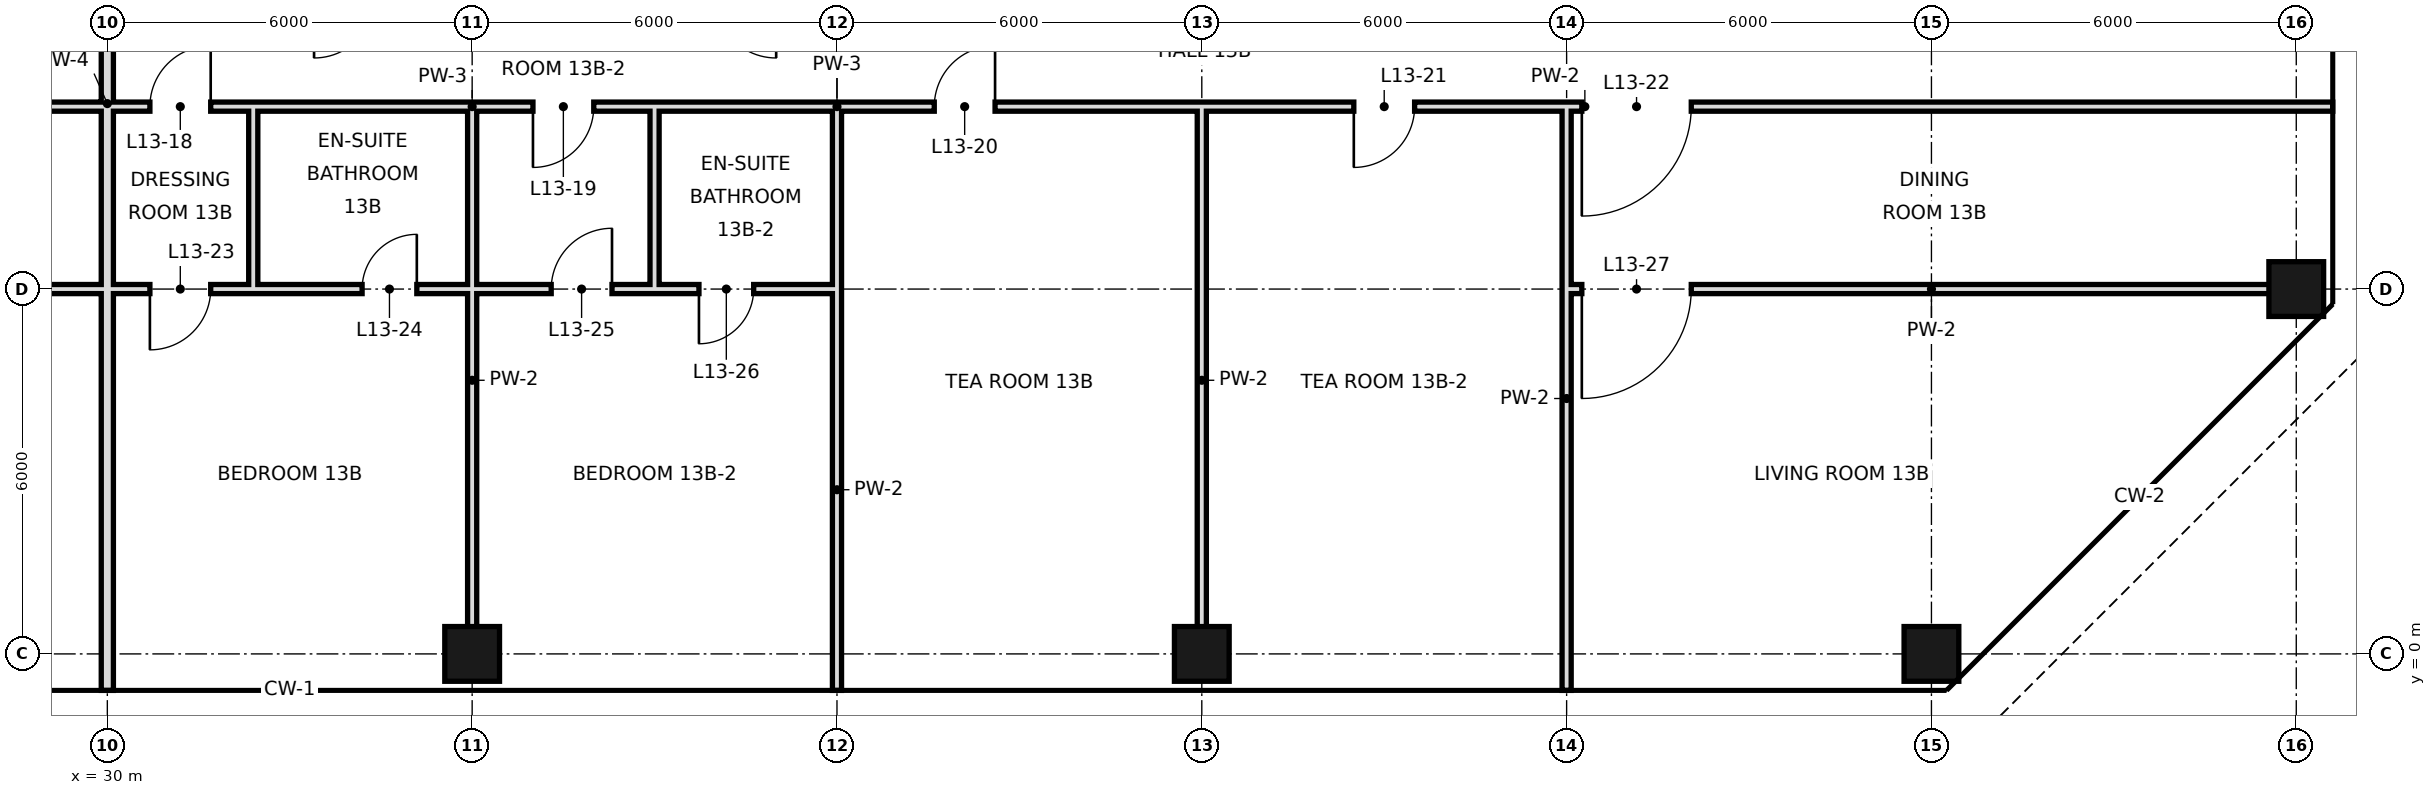
"""IFC4 building model, lengths in metres.
Left out: names, types, materials, properties, quantities, classifications, styles, units other than length and angle.
Written with IfcOpenShell. Run it as: python <this file> out.ifc"""

import sys

from ifc_helpers import new_model, si_unit, direction, frame, frame_2d, origin, origin_2d, place, context, subcontext, project, spatial, rectangle, hollow_rectangle, extrude, element, fill, save


model = new_model("IFC4")
c1 = context("Model", 3, precision=1e-05, world=origin(), true_north=direction((0.0, 1.0)))
c2 = subcontext(c1, "Body", "Model", "MODEL_VIEW")
j1 = project(units=[si_unit("LENGTHUNIT", "METRE"), si_unit("PLANEANGLEUNIT", "RADIAN")], contexts=[c1])
p1 = place(None, origin())
s1 = spatial("IfcSite", under=j1, at=p1, CompositionType="ELEMENT")
p2 = place(p1, origin())
s2 = spatial("IfcBuilding", under=s1, at=p2, CompositionType="ELEMENT")
p3 = place(p2, frame((0.0, 0.0, 67.8)))
s3 = spatial("IfcBuildingStorey", under=s2, at=p3, CompositionType="ELEMENT", Elevation=67.8)
for number, where, z_axis, x_axis in (
    (1, (36.0, 0.0, 0.0), (0.0, 0.0, 1.0), (1.0, 0.0, 0.0)),
    (2, (48.0, 0.0, 0.0), (0.0, 0.0, 1.0), (1.0, 0.0, 0.0)),
    (3, (60.0, 0.0, 0.0), (0.0, 0.0, 1.0), (1.0, 0.0, 0.0)),
    (4, (66.0, 6.0, 0.0), (0.0, 0.0, 1.0), (1.0, 0.0, 0.0)),
):
    element("IfcColumn", number, at=place(p3, frame(where, z_axis=z_axis, x_axis=x_axis)), inside=s3, PredefinedType="COLUMN", context=c2, shape_type="SweptSolid", body=[
        extrude(hollow_rectangle(XDim=0.9, YDim=0.9, WallThickness=0.045, at=origin_2d()), origin(), (0.0, 0.0, 1.0), 3.6),
    ])
p4 = place(p3, frame((30.0, -0.6, 0.0), z_axis=(0.0, 0.0, 1.0), x_axis=(0.0, 1.0, 0.0)))
e5 = element("IfcWall", 5, at=p4, inside=s3, PredefinedType="SOLIDWALL", context=c2, shape_type="SweptSolid", body=[
    extrude(rectangle(XDim=19.3, YDim=0.2, at=frame_2d((9.65, 0.0))), origin(), (0.0, 0.0, 1.0), 2.72),
])
p5 = place(p3, frame((32.4, 6.0, 0.0), z_axis=(0.0, 0.0, 1.0), x_axis=(0.0, 1.0, 0.0)))
e6 = element("IfcWall", 6, at=p5, inside=s3, PredefinedType="PARTITIONING", context=c2, shape_type="SweptSolid", body=[
    extrude(rectangle(XDim=3.0, YDim=0.15, at=frame_2d((1.5, 0.0))), origin(), (0.0, 0.0, 1.0), 3.42),
])
p6 = place(p3, frame((36.0, 0.0, 0.0), z_axis=(0.0, 0.0, 1.0), x_axis=(0.0, 1.0, 0.0)))
e7 = element("IfcWall", 7, at=p6, inside=s3, PredefinedType="PARTITIONING", context=c2, shape_type="SweptSolid", body=[
    extrude(rectangle(XDim=6.0, YDim=0.15, at=frame_2d((3.0, 0.0))), origin(), (0.0, 0.0, 1.0), 2.72),
])
p7 = place(p3, frame((36.0, 6.0, 0.0), z_axis=(0.0, 0.0, 1.0), x_axis=(0.0, 1.0, 0.0)))
e8 = element("IfcWall", 8, at=p7, inside=s3, PredefinedType="PARTITIONING", context=c2, shape_type="SweptSolid", body=[
    extrude(rectangle(XDim=3.0, YDim=0.15, at=frame_2d((1.5, 0.0))), origin(), (0.0, 0.0, 1.0), 2.72),
])
p8 = place(p3, frame((39.0, 6.0, 0.0), z_axis=(0.0, 0.0, 1.0), x_axis=(0.0, 1.0, 0.0)))
e9 = element("IfcWall", 9, at=p8, inside=s3, PredefinedType="PARTITIONING", context=c2, shape_type="SweptSolid", body=[
    extrude(rectangle(XDim=3.0, YDim=0.15, at=frame_2d((1.5, 0.0))), origin(), (0.0, 0.0, 1.0), 3.42),
])
p9 = place(p3, frame((42.0, -0.6, 0.0), z_axis=(0.0, 0.0, 1.0), x_axis=(0.0, 1.0, 0.0)))
e10 = element("IfcWall", 10, at=p9, inside=s3, PredefinedType="PARTITIONING", context=c2, shape_type="SweptSolid", body=[
    extrude(rectangle(XDim=6.6, YDim=0.15, at=frame_2d((3.3, 0.0))), origin(), (0.0, 0.0, 1.0), 2.72),
])
p10 = place(p3, frame((42.0, 6.0, 0.0), z_axis=(0.0, 0.0, 1.0), x_axis=(0.0, 1.0, 0.0)))
e11 = element("IfcWall", 11, at=p10, inside=s3, PredefinedType="PARTITIONING", context=c2, shape_type="SweptSolid", body=[
    extrude(rectangle(XDim=3.0, YDim=0.15, at=frame_2d((1.5, 0.0))), origin(), (0.0, 0.0, 1.0), 2.72),
])
p11 = place(p3, frame((48.0, 0.0, 0.0), z_axis=(0.0, 0.0, 1.0), x_axis=(0.0, 1.0, 0.0)))
e12 = element("IfcWall", 12, at=p11, inside=s3, PredefinedType="PARTITIONING", context=c2, shape_type="SweptSolid", body=[
    extrude(rectangle(XDim=9.0, YDim=0.15, at=frame_2d((4.5, 0.0))), origin(), (0.0, 0.0, 1.0), 2.72),
])
p12 = place(p3, frame((54.0, -0.6, 0.0), z_axis=(0.0, 0.0, 1.0), x_axis=(0.0, 1.0, 0.0)))
e13 = element("IfcWall", 13, at=p12, inside=s3, PredefinedType="PARTITIONING", context=c2, shape_type="SweptSolid", body=[
    extrude(rectangle(XDim=9.6, YDim=0.15, at=frame_2d((4.8, 0.0))), origin(), (0.0, 0.0, 1.0), 3.42),
])
p13 = place(p3, frame((30.0, 6.0, 0.0), z_axis=(0.0, 0.0, 1.0), x_axis=(1.0, 0.0, 0.0)))
e14 = element("IfcWall", 14, at=p13, inside=s3, PredefinedType="PARTITIONING", context=c2, shape_type="SweptSolid", body=[
    extrude(rectangle(XDim=2.4, YDim=0.15, at=frame_2d((1.2, 0.0))), origin(), (0.0, 0.0, 1.0), 2.97),
])
p14 = place(p13, frame((0.7, 0.0, 0.0)))
e15 = element("IfcOpeningElement", 15, at=p14, cuts=e14, PredefinedType="OPENING", context=c2, shape_type="SweptSolid", body=[
    extrude(rectangle(XDim=1.0, YDim=2.4, at=frame_2d((0.5, 1.2))), frame((0.0, 0.085, 0.0), z_axis=(0.0, -1.0, 0.0), x_axis=(1.0, 0.0, 0.0)), (0.0, 0.0, 1.0), 0.17),
])
p15 = place(p3, frame((36.0, 6.0, 0.0), z_axis=(0.0, 0.0, 1.0), x_axis=(1.0, 0.0, 0.0)))
e16 = element("IfcWall", 16, at=p15, inside=s3, PredefinedType="PARTITIONING", context=c2, shape_type="SweptSolid", body=[
    extrude(rectangle(XDim=3.0, YDim=0.15, at=frame_2d((1.5, 0.0))), origin(), (0.0, 0.0, 1.0), 2.97),
])
p16 = place(p15, frame((1.3, 0.0, 0.0)))
e17 = element("IfcOpeningElement", 17, at=p16, cuts=e16, PredefinedType="OPENING", context=c2, shape_type="SweptSolid", body=[
    extrude(rectangle(XDim=1.0, YDim=2.4, at=frame_2d((0.5, 1.2))), frame((0.0, 0.085, 0.0), z_axis=(0.0, -1.0, 0.0), x_axis=(1.0, 0.0, 0.0)), (0.0, 0.0, 1.0), 0.17),
])
p17 = place(p3, frame((54.0, 6.0, 0.0), z_axis=(0.0, 0.0, 1.0), x_axis=(1.0, 0.0, 0.0)))
e18 = element("IfcWall", 18, at=p17, inside=s3, PredefinedType="PARTITIONING", context=c2, shape_type="SweptSolid", body=[
    extrude(rectangle(XDim=12.0, YDim=0.15, at=frame_2d((6.0, 0.0))), origin(), (0.0, 0.0, 1.0), 2.52),
])
p18 = place(p17, frame((0.25, 0.0, 0.0)))
e19 = element("IfcOpeningElement", 19, at=p18, cuts=e18, PredefinedType="OPENING", context=c2, shape_type="SweptSolid", body=[
    extrude(rectangle(XDim=1.8, YDim=2.4, at=frame_2d((0.9, 1.2))), frame((0.0, 0.085, 0.0), z_axis=(0.0, -1.0, 0.0), x_axis=(1.0, 0.0, 0.0)), (0.0, 0.0, 1.0), 0.17),
])
p19 = place(p3, frame((26.4, 6.0, 0.0), z_axis=(0.0, 0.0, 1.0), x_axis=(1.0, 0.0, 0.0)))
e20 = element("IfcWall", 20, at=p19, inside=s3, PredefinedType="PARTITIONING", context=c2, shape_type="SweptSolid", body=[
    extrude(rectangle(XDim=3.6, YDim=0.15, at=frame_2d((1.8, 0.0))), origin(), (0.0, 0.0, 1.0), 2.97),
])
p20 = place(p19, frame((1.35, 0.0, 0.0)))
e21 = element("IfcOpeningElement", 21, at=p20, cuts=e20, PredefinedType="OPENING", context=c2, shape_type="SweptSolid", body=[
    extrude(rectangle(XDim=0.9, YDim=2.4, at=frame_2d((0.45, 1.2))), frame((0.0, 0.085, 0.0), z_axis=(0.0, -1.0, 0.0), x_axis=(1.0, 0.0, 0.0)), (0.0, 0.0, 1.0), 0.17),
])
p21 = place(p3, frame((32.4, 6.0, 0.0), z_axis=(0.0, 0.0, 1.0), x_axis=(1.0, 0.0, 0.0)))
e22 = element("IfcWall", 22, at=p21, inside=s3, PredefinedType="PARTITIONING", context=c2, shape_type="SweptSolid", body=[
    extrude(rectangle(XDim=3.6, YDim=0.15, at=frame_2d((1.8, 0.0))), origin(), (0.0, 0.0, 1.0), 2.97),
])
p22 = place(p21, frame((1.79, 0.0, 0.0)))
e23 = element("IfcOpeningElement", 23, at=p22, cuts=e22, PredefinedType="OPENING", context=c2, shape_type="SweptSolid", body=[
    extrude(rectangle(XDim=0.9, YDim=2.4, at=frame_2d((0.45, 1.2))), frame((0.0, 0.085, 0.0), z_axis=(0.0, -1.0, 0.0), x_axis=(1.0, 0.0, 0.0)), (0.0, 0.0, 1.0), 0.17),
])
p23 = place(p3, frame((39.0, 6.0, 0.0), z_axis=(0.0, 0.0, 1.0), x_axis=(1.0, 0.0, 0.0)))
e24 = element("IfcWall", 24, at=p23, inside=s3, PredefinedType="PARTITIONING", context=c2, shape_type="SweptSolid", body=[
    extrude(rectangle(XDim=3.0, YDim=0.15, at=frame_2d((1.5, 0.0))), origin(), (0.0, 0.0, 1.0), 2.97),
])
p24 = place(p23, frame((0.73, 0.0, 0.0)))
e25 = element("IfcOpeningElement", 25, at=p24, cuts=e24, PredefinedType="OPENING", context=c2, shape_type="SweptSolid", body=[
    extrude(rectangle(XDim=0.9, YDim=2.4, at=frame_2d((0.45, 1.2))), frame((0.0, 0.085, 0.0), z_axis=(0.0, -1.0, 0.0), x_axis=(1.0, 0.0, 0.0)), (0.0, 0.0, 1.0), 0.17),
])
p25 = place(p3, frame((30.0, 9.0, 0.0), z_axis=(0.0, 0.0, 1.0), x_axis=(1.0, 0.0, 0.0)))
e26 = element("IfcWall", 26, at=p25, inside=s3, PredefinedType="PARTITIONING", context=c2, shape_type="SweptSolid", body=[
    extrude(rectangle(XDim=2.4, YDim=0.15, at=frame_2d((1.2, 0.0))), origin(), (0.0, 0.0, 1.0), 3.42),
])
p26 = place(p25, frame((0.7, 0.0, 0.0)))
e27 = element("IfcOpeningElement", 27, at=p26, cuts=e26, PredefinedType="OPENING", context=c2, shape_type="SweptSolid", body=[
    extrude(rectangle(XDim=1.0, YDim=2.4, at=frame_2d((0.5, 1.2))), frame((0.0, 0.085, 0.0), z_axis=(0.0, -1.0, 0.0), x_axis=(1.0, 0.0, 0.0)), (0.0, 0.0, 1.0), 0.17),
])
p27 = place(p3, frame((36.0, 9.0, 0.0), z_axis=(0.0, 0.0, 1.0), x_axis=(1.0, 0.0, 0.0)))
e28 = element("IfcWall", 28, at=p27, inside=s3, PredefinedType="PARTITIONING", context=c2, shape_type="SweptSolid", body=[
    extrude(rectangle(XDim=3.0, YDim=0.15, at=frame_2d((1.5, 0.0))), origin(), (0.0, 0.0, 1.0), 3.42),
])
p28 = place(p27, frame((1.0, 0.0, 0.0)))
e29 = element("IfcOpeningElement", 29, at=p28, cuts=e28, PredefinedType="OPENING", context=c2, shape_type="SweptSolid", body=[
    extrude(rectangle(XDim=1.0, YDim=2.4, at=frame_2d((0.5, 1.2))), frame((0.0, 0.085, 0.0), z_axis=(0.0, -1.0, 0.0), x_axis=(1.0, 0.0, 0.0)), (0.0, 0.0, 1.0), 0.17),
])
p29 = place(p3, frame((42.0, 9.0, 0.0), z_axis=(0.0, 0.0, 1.0), x_axis=(1.0, 0.0, 0.0)))
e30 = element("IfcWall", 30, at=p29, inside=s3, PredefinedType="PARTITIONING", context=c2, shape_type="SweptSolid", body=[
    extrude(rectangle(XDim=24.6, YDim=0.15, at=frame_2d((12.3, 0.0))), origin(), (0.0, 0.0, 1.0), 3.42),
])
p30 = place(p29, frame((1.6, 0.0, 0.0)))
e31 = element("IfcOpeningElement", 31, at=p30, cuts=e30, PredefinedType="OPENING", context=c2, shape_type="SweptSolid", body=[
    extrude(rectangle(XDim=1.0, YDim=2.4, at=frame_2d((0.5, 1.2))), frame((0.0, 0.085, 0.0), z_axis=(0.0, -1.0, 0.0), x_axis=(1.0, 0.0, 0.0)), (0.0, 0.0, 1.0), 0.17),
])
p31 = place(p29, frame((8.5, 0.0, 0.0)))
e32 = element("IfcOpeningElement", 32, at=p31, cuts=e30, PredefinedType="OPENING", context=c2, shape_type="SweptSolid", body=[
    extrude(rectangle(XDim=1.0, YDim=2.4, at=frame_2d((0.5, 1.2))), frame((0.0, 0.085, 0.0), z_axis=(0.0, -1.0, 0.0), x_axis=(1.0, 0.0, 0.0)), (0.0, 0.0, 1.0), 0.17),
])
p32 = place(p29, frame((12.25, 0.0, 0.0)))
e33 = element("IfcOpeningElement", 33, at=p32, cuts=e30, PredefinedType="OPENING", context=c2, shape_type="SweptSolid", body=[
    extrude(rectangle(XDim=1.8, YDim=2.4, at=frame_2d((0.9, 1.2))), frame((0.0, 0.085, 0.0), z_axis=(0.0, -1.0, 0.0), x_axis=(1.0, 0.0, 0.0)), (0.0, 0.0, 1.0), 0.17),
])
for number, where, z_axis, x_axis in (
    (34, (26.4, 9.0, 0.0), (0.0, 0.0, 1.0), (1.0, 0.0, 0.0)),
    (35, (32.4, 9.0, 0.0), (0.0, 0.0, 1.0), (1.0, 0.0, 0.0)),
):
    element("IfcWall", number, at=place(p3, frame(where, z_axis=z_axis, x_axis=x_axis)), inside=s3, PredefinedType="PARTITIONING", context=c2, shape_type="SweptSolid", body=[
        extrude(rectangle(XDim=3.6, YDim=0.15, at=frame_2d((1.8, 0.0))), origin(), (0.0, 0.0, 1.0), 3.42),
    ])
p33 = place(p3, frame((39.0, 9.0, 0.0), z_axis=(0.0, 0.0, 1.0), x_axis=(1.0, 0.0, 0.0)))
e36 = element("IfcWall", 36, at=p33, inside=s3, PredefinedType="PARTITIONING", context=c2, shape_type="SweptSolid", body=[
    extrude(rectangle(XDim=3.0, YDim=0.15, at=frame_2d((1.5, 0.0))), origin(), (0.0, 0.0, 1.0), 3.42),
])
p34 = place(p26, frame((1.0, 0.0, 0.0), z_axis=(0.0, 0.0, 1.0), x_axis=(-1.0, 0.0, 0.0)))
e37 = element("IfcDoor", 37, at=p34, inside=s3, OperationType="SINGLE_SWING_LEFT", PredefinedType="DOOR", context=c2, shape_type="SweptSolid", body=[
    extrude(rectangle(XDim=1.0, YDim=2.4, at=frame_2d((0.5, 1.2))), frame((0.0, 0.025, 0.0), z_axis=(0.0, -1.0, 0.0), x_axis=(1.0, 0.0, 0.0)), (0.0, 0.0, 1.0), 0.05),
])
fill(e27, e37)
p35 = place(p28, frame((1.0, 0.0, 0.0), z_axis=(0.0, 0.0, 1.0), x_axis=(-1.0, 0.0, 0.0)))
e38 = element("IfcDoor", 38, at=p35, inside=s3, OperationType="SINGLE_SWING_RIGHT", PredefinedType="DOOR", context=c2, shape_type="SweptSolid", body=[
    extrude(rectangle(XDim=1.0, YDim=2.4, at=frame_2d((0.5, 1.2))), frame((0.0, 0.025, 0.0), z_axis=(0.0, -1.0, 0.0), x_axis=(1.0, 0.0, 0.0)), (0.0, 0.0, 1.0), 0.05),
])
fill(e29, e38)
p36 = place(p30, frame((1.0, 0.0, 0.0), z_axis=(0.0, 0.0, 1.0), x_axis=(-1.0, 0.0, 0.0)))
e39 = element("IfcDoor", 39, at=p36, inside=s3, OperationType="SINGLE_SWING_LEFT", PredefinedType="DOOR", context=c2, shape_type="SweptSolid", body=[
    extrude(rectangle(XDim=1.0, YDim=2.4, at=frame_2d((0.5, 1.2))), frame((0.0, 0.025, 0.0), z_axis=(0.0, -1.0, 0.0), x_axis=(1.0, 0.0, 0.0)), (0.0, 0.0, 1.0), 0.05),
])
fill(e31, e39)
p37 = place(p31, frame((1.0, 0.0, 0.0), z_axis=(0.0, 0.0, 1.0), x_axis=(-1.0, 0.0, 0.0)))
e40 = element("IfcDoor", 40, at=p37, inside=s3, OperationType="SINGLE_SWING_RIGHT", PredefinedType="DOOR", context=c2, shape_type="SweptSolid", body=[
    extrude(rectangle(XDim=1.0, YDim=2.4, at=frame_2d((0.5, 1.2))), frame((0.0, 0.025, 0.0), z_axis=(0.0, -1.0, 0.0), x_axis=(1.0, 0.0, 0.0)), (0.0, 0.0, 1.0), 0.05),
])
fill(e32, e40)
p38 = place(p32, frame((1.8, 0.0, 0.0), z_axis=(0.0, 0.0, 1.0), x_axis=(-1.0, 0.0, 0.0)))
e41 = element("IfcDoor", 41, at=p38, inside=s3, OperationType="SINGLE_SWING_RIGHT", PredefinedType="DOOR", context=c2, shape_type="SweptSolid", body=[
    extrude(rectangle(XDim=1.8, YDim=2.4, at=frame_2d((0.9, 1.2))), frame((0.0, 0.025, 0.0), z_axis=(0.0, -1.0, 0.0), x_axis=(1.0, 0.0, 0.0)), (0.0, 0.0, 1.0), 0.05),
])
fill(e33, e41)
p39 = place(p14, frame((1.0, 0.0, 0.0), z_axis=(0.0, 0.0, 1.0), x_axis=(-1.0, 0.0, 0.0)))
e42 = element("IfcDoor", 42, at=p39, inside=s3, OperationType="SINGLE_SWING_RIGHT", PredefinedType="DOOR", context=c2, shape_type="SweptSolid", body=[
    extrude(rectangle(XDim=1.0, YDim=2.4, at=frame_2d((0.5, 1.2))), frame((0.0, 0.025, 0.0), z_axis=(0.0, -1.0, 0.0), x_axis=(1.0, 0.0, 0.0)), (0.0, 0.0, 1.0), 0.05),
])
fill(e15, e42)
p40 = place(p22, frame((0.9, 0.0, 0.0), z_axis=(0.0, 0.0, 1.0), x_axis=(-1.0, 0.0, 0.0)))
e43 = element("IfcDoor", 43, at=p40, inside=s3, OperationType="SINGLE_SWING_LEFT", PredefinedType="DOOR", context=c2, shape_type="SweptSolid", body=[
    extrude(rectangle(XDim=0.9, YDim=2.4, at=frame_2d((0.45, 1.2))), frame((0.0, 0.025, 0.0), z_axis=(0.0, -1.0, 0.0), x_axis=(1.0, 0.0, 0.0)), (0.0, 0.0, 1.0), 0.05),
])
fill(e23, e43)
p41 = place(p16, frame((1.0, 0.0, 0.0), z_axis=(0.0, 0.0, 1.0), x_axis=(-1.0, 0.0, 0.0)))
e44 = element("IfcDoor", 44, at=p41, inside=s3, OperationType="SINGLE_SWING_LEFT", PredefinedType="DOOR", context=c2, shape_type="SweptSolid", body=[
    extrude(rectangle(XDim=1.0, YDim=2.4, at=frame_2d((0.5, 1.2))), frame((0.0, 0.025, 0.0), z_axis=(0.0, -1.0, 0.0), x_axis=(1.0, 0.0, 0.0)), (0.0, 0.0, 1.0), 0.05),
])
fill(e17, e44)
p42 = place(p24, frame((0.9, 0.0, 0.0), z_axis=(0.0, 0.0, 1.0), x_axis=(-1.0, 0.0, 0.0)))
e45 = element("IfcDoor", 45, at=p42, inside=s3, OperationType="SINGLE_SWING_RIGHT", PredefinedType="DOOR", context=c2, shape_type="SweptSolid", body=[
    extrude(rectangle(XDim=0.9, YDim=2.4, at=frame_2d((0.45, 1.2))), frame((0.0, 0.025, 0.0), z_axis=(0.0, -1.0, 0.0), x_axis=(1.0, 0.0, 0.0)), (0.0, 0.0, 1.0), 0.05),
])
fill(e25, e45)
p43 = place(p18, frame((1.8, 0.0, 0.0), z_axis=(0.0, 0.0, 1.0), x_axis=(-1.0, 0.0, 0.0)))
e46 = element("IfcDoor", 46, at=p43, inside=s3, OperationType="SINGLE_SWING_RIGHT", PredefinedType="DOOR", context=c2, shape_type="SweptSolid", body=[
    extrude(rectangle(XDim=1.8, YDim=2.4, at=frame_2d((0.9, 1.2))), frame((0.0, 0.025, 0.0), z_axis=(0.0, -1.0, 0.0), x_axis=(1.0, 0.0, 0.0)), (0.0, 0.0, 1.0), 0.05),
])
fill(e19, e46)
save(model, sys.argv[1])
